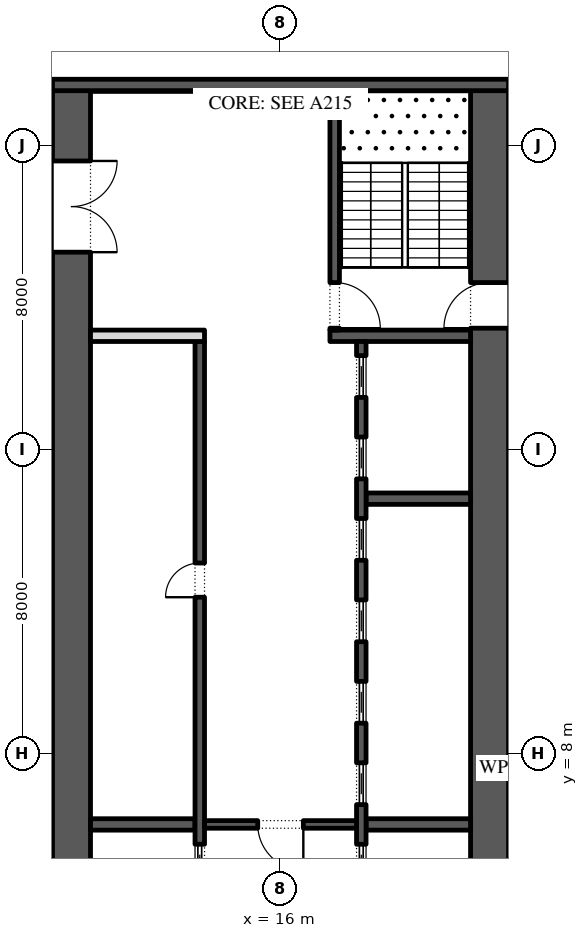
"""IFC4 building model, lengths in metres.
Left out: names, types, materials, properties, quantities, classifications, styles, units other than length and angle.
Written with IfcOpenShell. Run it as: python <this file> out.ifc"""

import sys

from ifc_helpers import new_model, si_unit, direction, frame, frame_2d, origin, place, context, subcontext, project, spatial, rectangle, extrude, element, fill, save


model = new_model("IFC4")
c1 = context("Model", 3, precision=1e-05, world=origin(), true_north=direction((0.0, 1.0)))
c2 = subcontext(c1, "Body", "Model", "MODEL_VIEW")
j1 = project(units=[si_unit("LENGTHUNIT", "METRE"), si_unit("PLANEANGLEUNIT", "RADIAN")], contexts=[c1])
p1 = place(None, origin())
s1 = spatial("IfcSite", under=j1, at=p1, CompositionType="ELEMENT")
p2 = place(p1, origin())
s2 = spatial("IfcBuilding", under=s1, at=p2, CompositionType="ELEMENT")
p3 = place(p2, frame((0.0, 0.0, 60.6)))
s3 = spatial("IfcBuildingStorey", under=s2, at=p3, CompositionType="ELEMENT", Elevation=60.6)
p4 = place(p3, frame((21.5, -2.45, 0.0), z_axis=(0.0, 0.0, 1.0), x_axis=(0.0, 1.0, 0.0)))
e1 = element("IfcWall", 1, at=p4, inside=s3, PredefinedType="SHEAR", context=c2, shape_type="SweptSolid", body=[
    extrude(rectangle(XDim=27.9, YDim=1.0, at=frame_2d((13.95, 0.0))), origin(), (0.0, 0.0, 1.0), 4.0),
])
p5 = place(p4, frame((5.05, 0.0, 0.0)))
e2 = element("IfcOpeningElement", 2, at=p5, cuts=e1, PredefinedType="OPENING", context=c2, shape_type="SweptSolid", body=[
    extrude(rectangle(XDim=1.2, YDim=2.1, at=frame_2d((0.6, 1.05))), frame((0.0, 0.51, 0.0), z_axis=(0.0, -1.0, 0.0), x_axis=(1.0, 0.0, 0.0)), (0.0, 0.0, 1.0), 1.02),
])
p6 = place(p4, frame((21.65, 0.0, 0.0)))
e3 = element("IfcOpeningElement", 3, at=p6, cuts=e1, PredefinedType="OPENING", context=c2, shape_type="SweptSolid", body=[
    extrude(rectangle(XDim=1.2, YDim=2.1, at=frame_2d((0.6, 1.05))), frame((0.0, 0.51, 0.0), z_axis=(0.0, -1.0, 0.0), x_axis=(1.0, 0.0, 0.0)), (0.0, 0.0, 1.0), 1.02),
])
p7 = place(p3, frame((10.5, -2.45, 0.0), z_axis=(0.0, 0.0, 1.0), x_axis=(0.0, 1.0, 0.0)))
e4 = element("IfcWall", 4, at=p7, inside=s3, PredefinedType="SHEAR", context=c2, shape_type="SweptSolid", body=[
    extrude(rectangle(XDim=27.9, YDim=1.0, at=frame_2d((13.95, 0.0))), origin(), (0.0, 0.0, 1.0), 4.0),
])
p8 = place(p7, frame((23.65, 0.0, 0.0)))
e5 = element("IfcOpeningElement", 5, at=p8, cuts=e4, PredefinedType="OPENING", context=c2, shape_type="SweptSolid", body=[
    extrude(rectangle(XDim=2.4, YDim=2.1, at=frame_2d((1.2, 1.05))), frame((0.0, 0.51, 0.0), z_axis=(0.0, -1.0, 0.0), x_axis=(1.0, 0.0, 0.0)), (0.0, 0.0, 1.0), 1.02),
])
p9 = place(p7, frame((1.087, 0.0, 0.0)))
e6 = element("IfcOpeningElement", 6, at=p9, cuts=e4, PredefinedType="OPENING", context=c2, shape_type="SweptSolid", body=[
    extrude(rectangle(XDim=0.9, YDim=2.1, at=frame_2d((0.45, 1.05))), frame((0.0, 0.51, 0.0), z_axis=(0.0, -1.0, 0.0), x_axis=(1.0, 0.0, 0.0)), (0.0, 0.0, 1.0), 1.02),
])
p10 = place(p7, frame((4.312, 0.0, 0.0)))
e7 = element("IfcOpeningElement", 7, at=p10, cuts=e4, PredefinedType="OPENING", context=c2, shape_type="SweptSolid", body=[
    extrude(rectangle(XDim=0.9, YDim=2.1, at=frame_2d((0.45, 1.05))), frame((0.0, 0.51, 0.0), z_axis=(0.0, -1.0, 0.0), x_axis=(1.0, 0.0, 0.0)), (0.0, 0.0, 1.0), 1.02),
])
p11 = place(p3, frame((10.0, 25.6, 0.0), z_axis=(0.0, 0.0, 1.0), x_axis=(1.0, 0.0, 0.0)))
e8 = element("IfcWall", 8, at=p11, inside=s3, PredefinedType="SHEAR", context=c2, shape_type="SweptSolid", body=[
    extrude(rectangle(XDim=12.0, YDim=0.3, at=frame_2d((6.0, 0.0))), origin(), (0.0, 0.0, 1.0), 4.0),
])
p12 = place(p3, frame((17.3, 19.0, 0.0), z_axis=(0.0, 0.0, 1.0), x_axis=(1.0, 0.0, 0.0)))
e9 = element("IfcWall", 9, at=p12, inside=s3, PredefinedType="SHEAR", context=c2, shape_type="SweptSolid", body=[
    extrude(rectangle(XDim=3.7, YDim=0.3, at=frame_2d((1.85, 0.0))), origin(), (0.0, 0.0, 1.0), 4.0),
])
p13 = place(p3, frame((17.425, 19.15, 0.0), z_axis=(0.0, 0.0, 1.0), x_axis=(0.0, 1.0, 0.0)))
e10 = element("IfcWall", 10, at=p13, inside=s3, PredefinedType="SHEAR", context=c2, shape_type="SweptSolid", body=[
    extrude(rectangle(XDim=6.3, YDim=0.25, at=frame_2d((3.15, 0.0))), origin(), (0.0, 0.0, 1.0), 4.0),
])
p14 = place(p13, frame((0.05, 0.0, 0.0)))
e11 = element("IfcOpeningElement", 11, at=p14, cuts=e10, PredefinedType="OPENING", context=c2, shape_type="SweptSolid", body=[
    extrude(rectangle(XDim=1.2, YDim=2.1, at=frame_2d((0.6, 1.05))), frame((0.0, 0.135, 0.0), z_axis=(0.0, -1.0, 0.0), x_axis=(1.0, 0.0, 0.0)), (0.0, 0.0, 1.0), 0.27),
])
for number, where, z_axis, x_axis in (
    (12, (18.25, 6.143, 0.0), (0.0, 0.0, 1.0), (1.0, 0.0, 0.0)),
    (13, (18.25, 14.714, 0.0), (0.0, 0.0, 1.0), (1.0, 0.0, 0.0)),
):
    element("IfcWall", number, at=place(p3, frame(where, z_axis=z_axis, x_axis=x_axis)), inside=s3, PredefinedType="SHEAR", context=c2, shape_type="SweptSolid", body=[
        extrude(rectangle(XDim=2.75, YDim=0.3, at=frame_2d((1.375, 0.0))), origin(), (0.0, 0.0, 1.0), 4.0),
    ])
p15 = place(p3, frame((18.125, 4.15, 0.0), z_axis=(0.0, 0.0, 1.0), x_axis=(0.0, 1.0, 0.0)))
e14 = element("IfcWall", 14, at=p15, inside=s3, PredefinedType="SHEAR", context=c2, shape_type="SweptSolid", body=[
    extrude(rectangle(XDim=14.7, YDim=0.25, at=frame_2d((7.35, 0.0))), origin(), (0.0, 0.0, 1.0), 4.0),
])
p16 = place(p15, frame((0.371, 0.0, 0.0)))
e15 = element("IfcOpeningElement", 15, at=p16, cuts=e14, PredefinedType="OPENING", context=c2, shape_type="SweptSolid", body=[
    extrude(rectangle(XDim=1.1, YDim=2.1, at=frame_2d((0.55, 1.05))), frame((0.0, 0.135, 0.0), z_axis=(0.0, -1.0, 0.0), x_axis=(1.0, 0.0, 0.0)), (0.0, 0.0, 1.0), 0.27),
])
p17 = place(p15, frame((2.514, 0.0, 0.0)))
e16 = element("IfcOpeningElement", 16, at=p17, cuts=e14, PredefinedType="OPENING", context=c2, shape_type="SweptSolid", body=[
    extrude(rectangle(XDim=1.1, YDim=2.1, at=frame_2d((0.55, 1.05))), frame((0.0, 0.135, 0.0), z_axis=(0.0, -1.0, 0.0), x_axis=(1.0, 0.0, 0.0)), (0.0, 0.0, 1.0), 0.27),
])
p18 = place(p15, frame((4.657, 0.0, 0.0)))
e17 = element("IfcOpeningElement", 17, at=p18, cuts=e14, PredefinedType="OPENING", context=c2, shape_type="SweptSolid", body=[
    extrude(rectangle(XDim=1.1, YDim=2.1, at=frame_2d((0.55, 1.05))), frame((0.0, 0.135, 0.0), z_axis=(0.0, -1.0, 0.0), x_axis=(1.0, 0.0, 0.0)), (0.0, 0.0, 1.0), 0.27),
])
p19 = place(p15, frame((6.8, 0.0, 0.0)))
e18 = element("IfcOpeningElement", 18, at=p19, cuts=e14, PredefinedType="OPENING", context=c2, shape_type="SweptSolid", body=[
    extrude(rectangle(XDim=1.1, YDim=2.1, at=frame_2d((0.55, 1.05))), frame((0.0, 0.135, 0.0), z_axis=(0.0, -1.0, 0.0), x_axis=(1.0, 0.0, 0.0)), (0.0, 0.0, 1.0), 0.27),
])
p20 = place(p15, frame((8.943, 0.0, 0.0)))
e19 = element("IfcOpeningElement", 19, at=p20, cuts=e14, PredefinedType="OPENING", context=c2, shape_type="SweptSolid", body=[
    extrude(rectangle(XDim=1.1, YDim=2.1, at=frame_2d((0.55, 1.05))), frame((0.0, 0.135, 0.0), z_axis=(0.0, -1.0, 0.0), x_axis=(1.0, 0.0, 0.0)), (0.0, 0.0, 1.0), 0.27),
])
p21 = place(p15, frame((11.086, 0.0, 0.0)))
e20 = element("IfcOpeningElement", 20, at=p21, cuts=e14, PredefinedType="OPENING", context=c2, shape_type="SweptSolid", body=[
    extrude(rectangle(XDim=1.1, YDim=2.1, at=frame_2d((0.55, 1.05))), frame((0.0, 0.135, 0.0), z_axis=(0.0, -1.0, 0.0), x_axis=(1.0, 0.0, 0.0)), (0.0, 0.0, 1.0), 0.27),
])
p22 = place(p15, frame((13.229, 0.0, 0.0)))
e21 = element("IfcOpeningElement", 21, at=p22, cuts=e14, PredefinedType="OPENING", context=c2, shape_type="SweptSolid", body=[
    extrude(rectangle(XDim=1.1, YDim=2.1, at=frame_2d((0.55, 1.05))), frame((0.0, 0.135, 0.0), z_axis=(0.0, -1.0, 0.0), x_axis=(1.0, 0.0, 0.0)), (0.0, 0.0, 1.0), 0.27),
])
p23 = place(p3, frame((11.0, 6.143, 0.0), z_axis=(0.0, 0.0, 1.0), x_axis=(1.0, 0.0, 0.0)))
e22 = element("IfcWall", 22, at=p23, inside=s3, PredefinedType="SHEAR", context=c2, shape_type="SweptSolid", body=[
    extrude(rectangle(XDim=2.75, YDim=0.3, at=frame_2d((1.375, 0.0))), origin(), (0.0, 0.0, 1.0), 4.0),
])
p24 = place(p3, frame((13.875, -2.45, 0.0), z_axis=(0.0, 0.0, 1.0), x_axis=(0.0, 1.0, 0.0)))
e23 = element("IfcWall", 23, at=p24, inside=s3, PredefinedType="SHEAR", context=c2, shape_type="SweptSolid", body=[
    extrude(rectangle(XDim=21.3, YDim=0.25, at=frame_2d((10.65, 0.0))), origin(), (0.0, 0.0, 1.0), 4.0),
])
p25 = place(p24, frame((14.571, 0.0, 0.0)))
e24 = element("IfcOpeningElement", 24, at=p25, cuts=e23, PredefinedType="OPENING", context=c2, shape_type="SweptSolid", body=[
    extrude(rectangle(XDim=0.9, YDim=2.1, at=frame_2d((0.45, 1.05))), frame((0.0, 0.135, 0.0), z_axis=(0.0, -1.0, 0.0), x_axis=(1.0, 0.0, 0.0)), (0.0, 0.0, 1.0), 0.27),
])
p26 = place(p24, frame((6.971, 0.0, 0.0)))
e25 = element("IfcOpeningElement", 25, at=p26, cuts=e23, PredefinedType="OPENING", context=c2, shape_type="SweptSolid", body=[
    extrude(rectangle(XDim=1.1, YDim=2.1, at=frame_2d((0.55, 1.05))), frame((0.0, 0.135, 0.0), z_axis=(0.0, -1.0, 0.0), x_axis=(1.0, 0.0, 0.0)), (0.0, 0.0, 1.0), 0.27),
])
p27 = place(p3, frame((11.0, 19.0, 0.0), z_axis=(0.0, 0.0, 1.0), x_axis=(1.0, 0.0, 0.0)))
e26 = element("IfcWall", 26, at=p27, inside=s3, PredefinedType="PARTITIONING", context=c2, shape_type="SweptSolid", body=[
    extrude(rectangle(XDim=3.0, YDim=0.3, at=frame_2d((1.5, 0.0))), origin(), (0.0, 0.0, 1.0), 4.0),
])
p28 = place(p3, frame((14.0, 6.143, 0.0), z_axis=(0.0, 0.0, 1.0), x_axis=(1.0, 0.0, 0.0)))
e27 = element("IfcWall", 27, at=p28, inside=s3, PredefinedType="SHEAR", context=c2, shape_type="SweptSolid", body=[
    extrude(rectangle(XDim=4.0, YDim=0.2, at=frame_2d((2.0, 0.0))), origin(), (0.0, 0.0, 1.0), 4.0),
])
p29 = place(p28, frame((1.4, 0.0, 0.0)))
e28 = element("IfcOpeningElement", 28, at=p29, cuts=e27, PredefinedType="OPENING", context=c2, shape_type="SweptSolid", body=[
    extrude(rectangle(XDim=1.2, YDim=2.1, at=frame_2d((0.6, 1.05))), frame((0.0, 0.11, 0.0), z_axis=(0.0, -1.0, 0.0), x_axis=(1.0, 0.0, 0.0)), (0.0, 0.0, 1.0), 0.22),
])
p30 = place(p16, origin())
e29 = element("IfcDoor", 29, at=p30, inside=s3, OperationType="SLIDING_TO_LEFT", PredefinedType="DOOR", context=c2, shape_type="SweptSolid", body=[
    extrude(rectangle(XDim=1.1, YDim=2.1, at=frame_2d((0.55, 1.05))), frame((0.0, 0.025, 0.0), z_axis=(0.0, -1.0, 0.0), x_axis=(1.0, 0.0, 0.0)), (0.0, 0.0, 1.0), 0.05),
])
fill(e15, e29)
p31 = place(p17, origin())
e30 = element("IfcDoor", 30, at=p31, inside=s3, OperationType="SLIDING_TO_LEFT", PredefinedType="DOOR", context=c2, shape_type="SweptSolid", body=[
    extrude(rectangle(XDim=1.1, YDim=2.1, at=frame_2d((0.55, 1.05))), frame((0.0, 0.025, 0.0), z_axis=(0.0, -1.0, 0.0), x_axis=(1.0, 0.0, 0.0)), (0.0, 0.0, 1.0), 0.05),
])
fill(e16, e30)
p32 = place(p18, origin())
e31 = element("IfcDoor", 31, at=p32, inside=s3, OperationType="SLIDING_TO_LEFT", PredefinedType="DOOR", context=c2, shape_type="SweptSolid", body=[
    extrude(rectangle(XDim=1.1, YDim=2.1, at=frame_2d((0.55, 1.05))), frame((0.0, 0.025, 0.0), z_axis=(0.0, -1.0, 0.0), x_axis=(1.0, 0.0, 0.0)), (0.0, 0.0, 1.0), 0.05),
])
fill(e17, e31)
p33 = place(p19, origin())
e32 = element("IfcDoor", 32, at=p33, inside=s3, OperationType="SLIDING_TO_LEFT", PredefinedType="DOOR", context=c2, shape_type="SweptSolid", body=[
    extrude(rectangle(XDim=1.1, YDim=2.1, at=frame_2d((0.55, 1.05))), frame((0.0, 0.025, 0.0), z_axis=(0.0, -1.0, 0.0), x_axis=(1.0, 0.0, 0.0)), (0.0, 0.0, 1.0), 0.05),
])
fill(e18, e32)
p34 = place(p20, origin())
e33 = element("IfcDoor", 33, at=p34, inside=s3, OperationType="SLIDING_TO_LEFT", PredefinedType="DOOR", context=c2, shape_type="SweptSolid", body=[
    extrude(rectangle(XDim=1.1, YDim=2.1, at=frame_2d((0.55, 1.05))), frame((0.0, 0.025, 0.0), z_axis=(0.0, -1.0, 0.0), x_axis=(1.0, 0.0, 0.0)), (0.0, 0.0, 1.0), 0.05),
])
fill(e19, e33)
p35 = place(p21, origin())
e34 = element("IfcDoor", 34, at=p35, inside=s3, OperationType="SLIDING_TO_LEFT", PredefinedType="DOOR", context=c2, shape_type="SweptSolid", body=[
    extrude(rectangle(XDim=1.1, YDim=2.1, at=frame_2d((0.55, 1.05))), frame((0.0, 0.025, 0.0), z_axis=(0.0, -1.0, 0.0), x_axis=(1.0, 0.0, 0.0)), (0.0, 0.0, 1.0), 0.05),
])
fill(e20, e34)
p36 = place(p22, origin())
e35 = element("IfcDoor", 35, at=p36, inside=s3, OperationType="SLIDING_TO_LEFT", PredefinedType="DOOR", context=c2, shape_type="SweptSolid", body=[
    extrude(rectangle(XDim=1.1, YDim=2.1, at=frame_2d((0.55, 1.05))), frame((0.0, 0.025, 0.0), z_axis=(0.0, -1.0, 0.0), x_axis=(1.0, 0.0, 0.0)), (0.0, 0.0, 1.0), 0.05),
])
fill(e21, e35)
p37 = place(p25, origin())
e36 = element("IfcDoor", 36, at=p37, inside=s3, OperationType="SINGLE_SWING_RIGHT", PredefinedType="DOOR", context=c2, shape_type="SweptSolid", body=[
    extrude(rectangle(XDim=0.9, YDim=2.1, at=frame_2d((0.45, 1.05))), frame((0.0, 0.125, 0.0), z_axis=(0.0, -1.0, 0.0), x_axis=(1.0, 0.0, 0.0)), (0.0, 0.0, 1.0), 0.05),
])
fill(e24, e36)
p38 = place(p26, origin())
e37 = element("IfcDoor", 37, at=p38, inside=s3, OperationType="SLIDING_TO_LEFT", PredefinedType="DOOR", context=c2, shape_type="SweptSolid", body=[
    extrude(rectangle(XDim=1.1, YDim=2.1, at=frame_2d((0.55, 1.05))), frame((0.0, 0.025, 0.0), z_axis=(0.0, -1.0, 0.0), x_axis=(1.0, 0.0, 0.0)), (0.0, 0.0, 1.0), 0.05),
])
fill(e25, e37)
p39 = place(p29, frame((1.2, 0.0, 0.0), z_axis=(0.0, 0.0, 1.0), x_axis=(-1.0, 0.0, 0.0)))
e38 = element("IfcDoor", 38, at=p39, inside=s3, OperationType="SINGLE_SWING_RIGHT", PredefinedType="DOOR", context=c2, shape_type="SweptSolid", body=[
    extrude(rectangle(XDim=1.2, YDim=2.1, at=frame_2d((0.6, 1.05))), frame((0.0, 0.025, 0.0), z_axis=(0.0, -1.0, 0.0), x_axis=(1.0, 0.0, 0.0)), (0.0, 0.0, 1.0), 0.05),
])
fill(e28, e38)
p40 = place(p8, frame((2.4, 0.0, 0.0), z_axis=(0.0, 0.0, 1.0), x_axis=(-1.0, 0.0, 0.0)))
e39 = element("IfcDoor", 39, at=p40, inside=s3, OperationType="DOUBLE_DOOR_SINGLE_SWING", PredefinedType="DOOR", context=c2, shape_type="SweptSolid", body=[
    extrude(rectangle(XDim=2.4, YDim=2.1, at=frame_2d((1.2, 1.05))), frame((0.0, 0.025, 0.0), z_axis=(0.0, -1.0, 0.0), x_axis=(1.0, 0.0, 0.0)), (0.0, 0.0, 1.0), 0.05),
])
fill(e5, e39)
p41 = place(p14, frame((1.2, 0.0, 0.0), z_axis=(0.0, 0.0, 1.0), x_axis=(-1.0, 0.0, 0.0)))
e40 = element("IfcDoor", 40, at=p41, inside=s3, OperationType="SINGLE_SWING_LEFT", PredefinedType="DOOR", context=c2, shape_type="SweptSolid", body=[
    extrude(rectangle(XDim=1.2, YDim=2.1, at=frame_2d((0.6, 1.05))), frame((0.0, 0.025, 0.0), z_axis=(0.0, -1.0, 0.0), x_axis=(1.0, 0.0, 0.0)), (0.0, 0.0, 1.0), 0.05),
])
fill(e11, e40)
p42 = place(p6, origin())
e41 = element("IfcDoor", 41, at=p42, inside=s3, OperationType="SINGLE_SWING_RIGHT", PredefinedType="DOOR", context=c2, shape_type="SweptSolid", body=[
    extrude(rectangle(XDim=1.2, YDim=2.1, at=frame_2d((0.6, 1.05))), frame((0.0, 0.025, 0.0), z_axis=(0.0, -1.0, 0.0), x_axis=(1.0, 0.0, 0.0)), (0.0, 0.0, 1.0), 0.05),
])
fill(e3, e41)
save(model, sys.argv[1])
